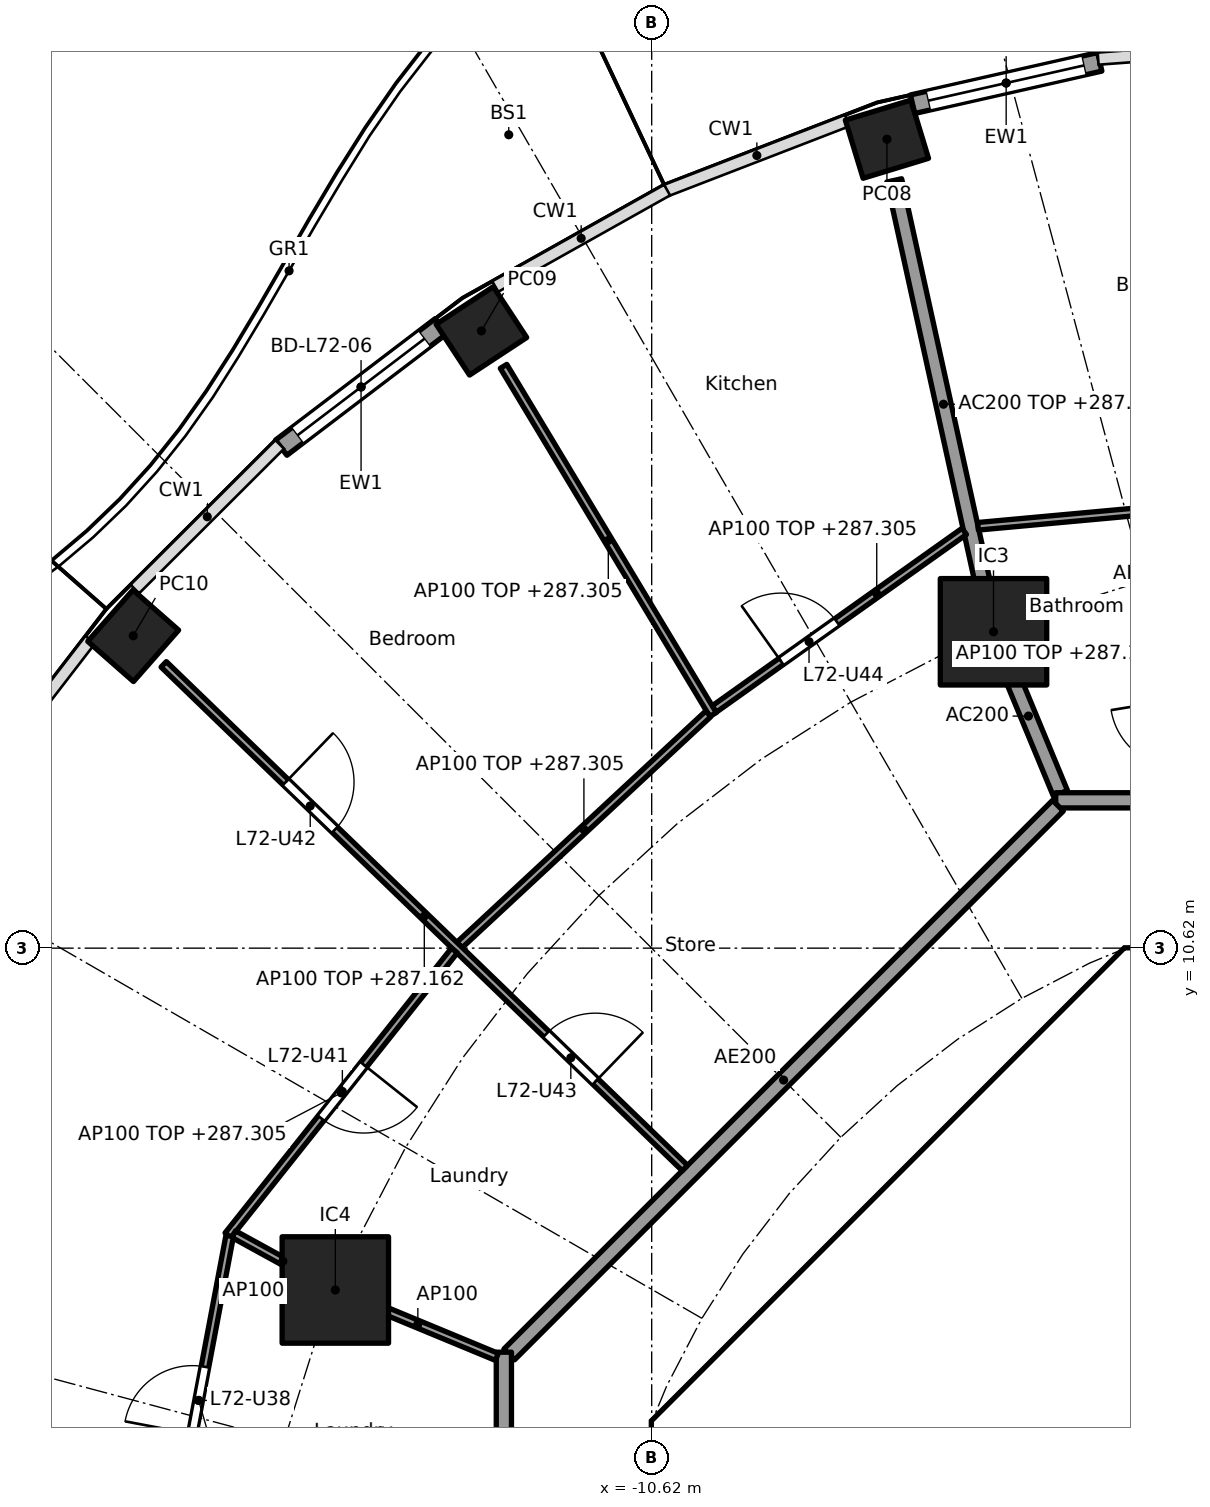
"""IFC4 building model, lengths in metres.
Left out: names, types, materials, properties, quantities, classifications, styles, units other than length and angle.
Written with IfcOpenShell. Run it as: python <this file> out.ifc"""

import sys

from ifc_helpers import new_model, si_unit, direction, frame, frame_2d, origin, origin_2d, place, context, subcontext, project, spatial, polyline, rectangle, hollow_rectangle, outline, extrude, element, fill, save


model = new_model("IFC4")
c1 = context("Model", 3, precision=1e-05, world=origin(), true_north=direction((0.0, 1.0)))
c2 = subcontext(c1, "Body", "Model", "MODEL_VIEW")
j1 = project(units=[si_unit("LENGTHUNIT", "METRE"), si_unit("PLANEANGLEUNIT", "RADIAN")], contexts=[c1])
p1 = place(None, origin())
s1 = spatial("IfcSite", under=j1, at=p1, CompositionType="ELEMENT")
p2 = place(p1, origin())
s2 = spatial("IfcBuilding", under=s1, at=p2, CompositionType="ELEMENT")
p3 = place(p2, frame((0.0, 0.0, 284.4)))
s3 = spatial("IfcBuildingStorey", under=s2, at=p3, CompositionType="ELEMENT", Elevation=284.4)
for number, where, z_axis, x_axis in (
    (1, (-7.525, 21.262, 0.0), (0.0, 0.0, 1.0), (-0.957, -0.292, 0.0)),
    (2, (-12.86, 18.741, 0.0), (0.0, 0.0, 1.0), (-0.836, -0.549, 0.0)),
    (3, (-17.441, 14.73, 0.0), (0.0, 0.0, 1.0), (-0.66, -0.751, 0.0)),
):
    element("IfcColumn", number, at=place(p3, frame(where, z_axis=z_axis, x_axis=x_axis)), inside=s3, PredefinedType="COLUMN", context=c2, shape_type="SweptSolid", body=[
        extrude(hollow_rectangle(XDim=0.9, YDim=0.8, WallThickness=0.028, at=origin_2d()), origin(), (0.0, 0.0, 1.0), 3.7),
    ])
for number, where, z_axis, x_axis in (
    (4, (-6.123, 14.782, 0.0), (0.0, 0.0, 1.0), (1.0, 0.0, 0.0)),
    (5, (-14.782, 6.123, 0.0), (0.0, 0.0, 1.0), (1.0, 0.0, 0.0)),
):
    element("IfcColumn", number, at=place(p3, frame(where, z_axis=z_axis, x_axis=x_axis)), inside=s3, PredefinedType="COLUMN", context=c2, shape_type="SweptSolid", body=[
        extrude(rectangle(XDim=1.4, YDim=1.4, at=origin_2d()), origin(), (0.0, 0.0, 1.0), 3.7),
    ])
p4 = place(p3, frame((-7.188, 21.723, 0.0), z_axis=(0.0, 0.0, 1.0), x_axis=(0.975319584032, 0.220797891756, 0.0)))
e6 = element("IfcWall", 6, at=p4, inside=s3, PredefinedType="SOLIDWALL", context=c2, shape_type="SweptSolid", body=[
    extrude(rectangle(XDim=2.525, YDim=0.25, at=frame_2d((1.263, 0.0))), origin(), (0.0, 0.0, 1.0), 3.44),
])
p5 = place(p4, frame((0.213, 0.0, 0.0)))
e7 = element("IfcOpeningElement", 7, at=p5, cuts=e6, PredefinedType="OPENING", context=c2, shape_type="SweptSolid", body=[
    extrude(rectangle(XDim=2.1, YDim=2.4, at=frame_2d((1.05, 1.2))), frame((0.0, 0.135, 0.0), z_axis=(0.0, -1.0, 0.0), x_axis=(1.0, 0.0, 0.0)), (0.0, 0.0, 1.0), 0.27),
])
p6 = place(p3, frame((-15.495, 17.204, 0.0), z_axis=(0.0, 0.0, 1.0), x_axis=(0.796010739377, 0.605282498339, 0.0)))
e8 = element("IfcWall", 8, at=p6, inside=s3, PredefinedType="SOLIDWALL", context=c2, shape_type="SweptSolid", body=[
    extrude(rectangle(XDim=2.641, YDim=0.25, at=frame_2d((1.32, 0.0))), origin(), (0.0, 0.0, 1.0), 3.44),
])
p7 = place(p6, frame((0.27, 0.0, 0.0)))
e9 = element("IfcOpeningElement", 9, at=p7, cuts=e8, PredefinedType="OPENING", context=c2, shape_type="SweptSolid", body=[
    extrude(rectangle(XDim=2.1, YDim=2.4, at=frame_2d((1.05, 1.2))), frame((0.0, 0.135, 0.0), z_axis=(0.0, -1.0, 0.0), x_axis=(1.0, 0.0, 0.0)), (0.0, 0.0, 1.0), 0.27),
])
p8 = place(p3, frame((-4.613, 9.988, 0.0), z_axis=(0.0, 0.0, 1.0), x_axis=(-0.707106781187, -0.707106781187, 0.0)))
e10 = element("IfcWall", 10, at=p8, inside=s3, PredefinedType="SHEAR", context=c2, shape_type="SweptSolid", body=[
    extrude(rectangle(XDim=7.602, YDim=0.6, at=frame_2d((3.801, 0.0))), origin(), (0.0, 0.0, 1.0), 3.44),
])
p9 = place(p8, frame((0.351, 0.0, 0.0)))
e11 = element("IfcOpeningElement", 11, at=p9, cuts=e10, PredefinedType="OPENING", context=c2, shape_type="SweptSolid", body=[
    extrude(rectangle(XDim=1.1, YDim=2.1, at=frame_2d((0.55, 1.05))), frame((0.0, 0.31, 0.0), z_axis=(0.0, -1.0, 0.0), x_axis=(1.0, 0.0, 0.0)), (0.0, 0.0, 1.0), 0.62),
])
p10 = place(p3, frame((-5.8, 4.3, 0.0), z_axis=(0.0, 0.0, 1.0), x_axis=(0.0, 1.0, 0.0)))
e12 = element("IfcWall", 12, at=p10, inside=s3, PredefinedType="PARTITIONING", context=c2, shape_type="SweptSolid", body=[
    extrude(rectangle(XDim=3.927, YDim=0.15, at=frame_2d((1.963, 0.0))), origin(), (0.0, 0.0, 1.0), 3.44),
])
p11 = place(p10, frame((0.262, 0.0, 0.0)))
e13 = element("IfcOpeningElement", 13, at=p11, cuts=e12, PredefinedType="OPENING", context=c2, shape_type="SweptSolid", body=[
    extrude(rectangle(XDim=0.9, YDim=2.1, at=frame_2d((0.45, 1.05))), frame((0.0, 0.085, 0.0), z_axis=(0.0, -1.0, 0.0), x_axis=(1.0, 0.0, 0.0)), (0.0, 0.0, 1.0), 0.17),
])
p12 = place(p10, frame((2.338, 0.0, 0.0)))
e14 = element("IfcOpeningElement", 14, at=p12, cuts=e12, PredefinedType="OPENING", context=c2, shape_type="SweptSolid", body=[
    extrude(rectangle(XDim=0.9, YDim=2.1, at=frame_2d((0.45, 1.05))), frame((0.0, 0.085, 0.0), z_axis=(0.0, -1.0, 0.0), x_axis=(1.0, 0.0, 0.0)), (0.0, 0.0, 1.0), 0.17),
])
p13 = place(p3, origin())
e15 = element("IfcWall", 15, at=p13, inside=s3, PredefinedType="SHEAR", context=c2, shape_type="SweptSolid", body=[
    extrude(outline(polyline([(-10.2, 4.825), (-9.776, 4.401), (-10.025, 4.152), (-10.025, 3.801), (-10.625, 3.801), (-10.625, 4.401), (-10.2, 4.825)])), origin(), (0.0, 0.0, 1.0), 3.44),
])
p14 = place(p3, origin())
e16 = element("IfcWall", 16, at=p14, inside=s3, PredefinedType="SHEAR", context=c2, shape_type="SweptSolid", body=[
    extrude(outline(polyline([(-4.152, 10.025), (-4.401, 9.776), (-4.825, 10.2), (-4.401, 10.625), (4.401, 10.625), (4.825, 10.2), (4.401, 9.776), (4.152, 10.025), (-4.152, 10.025)])), origin(), (0.0, 0.0, 1.0), 3.44),
])
p15 = place(p3, frame((-8.301, 5.8, 0.0), z_axis=(0.0, 0.0, 1.0), x_axis=(1.0, 0.0, 0.0)))
e17 = element("IfcWall", 17, at=p15, inside=s3, PredefinedType="PARTITIONING", context=c2, shape_type="SweptSolid", body=[
    extrude(rectangle(XDim=2.426, YDim=0.15, at=frame_2d((1.213, 0.0))), origin(), (0.0, 0.0, 1.0), 3.44),
])
p16 = place(p3, frame((-5.243, 12.657, 0.0), z_axis=(0.0, 0.0, 1.0), x_axis=(-0.38273085373, 0.923859888513, 0.0)))
e18 = element("IfcWall", 18, at=p16, inside=s3, PredefinedType="PARTITIONING", context=c2, shape_type="SweptSolid", body=[
    extrude(rectangle(XDim=2.199, YDim=0.2, at=frame_2d((1.1, 0.0))), origin(), (0.0, 0.0, 1.0), 3.44),
])
p17 = place(p3, frame((-6.134, 14.831, 0.0), z_axis=(0.0, 0.0, 1.0), x_axis=(-0.214842475666, 0.976648714047, 0.0)))
e19 = element("IfcWall", 19, at=p17, inside=s3, PredefinedType="PARTITIONING", context=c2, shape_type="SweptSolid", body=[
    extrude(rectangle(XDim=6.031, YDim=0.2, at=frame_2d((3.015, 0.0))), origin(), (0.0, 0.0, 1.0), 2.905),
])
p18 = place(p3, frame((5.104, 12.565, 0.0), z_axis=(0.0, 0.0, 1.0), x_axis=(-1.0, 0.0, 0.0)))
e20 = element("IfcWall", 20, at=p18, inside=s3, PredefinedType="PARTITIONING", context=c2, shape_type="SweptSolid", body=[
    extrude(rectangle(XDim=10.409, YDim=0.2, at=frame_2d((5.205, 0.0))), origin(), (0.0, 0.0, 1.0), 3.44),
])
p19 = place(p18, frame((6.339, 0.0, 0.0)))
e21 = element("IfcOpeningElement", 21, at=p19, cuts=e20, PredefinedType="OPENING", context=c2, shape_type="SweptSolid", body=[
    extrude(rectangle(XDim=1.0, YDim=2.1, at=frame_2d((0.5, 1.05))), frame((0.0, 0.11, 0.0), z_axis=(0.0, -1.0, 0.0), x_axis=(1.0, 0.0, 0.0)), (0.0, 0.0, 1.0), 0.22),
])
p20 = place(p3, frame((-5.275, 12.494, 0.0), z_axis=(0.0, 0.0, 1.0), x_axis=(-0.707106781187, -0.707106781187, 0.0)))
e22 = element("IfcWall", 22, at=p20, inside=s3, PredefinedType="PARTITIONING", context=c2, shape_type="SweptSolid", body=[
    extrude(rectangle(XDim=10.209, YDim=0.2, at=frame_2d((5.104, 0.0))), origin(), (0.0, 0.0, 1.0), 3.44),
])
p21 = place(p3, frame((-12.565, 5.304, 0.0), z_axis=(0.0, 0.0, 1.0), x_axis=(0.0, -1.0, 0.0)))
e23 = element("IfcWall", 23, at=p21, inside=s3, PredefinedType="PARTITIONING", context=c2, shape_type="SweptSolid", body=[
    extrude(rectangle(XDim=10.409, YDim=0.2, at=frame_2d((5.205, 0.0))), origin(), (0.0, 0.0, 1.0), 3.44),
])
p22 = place(p21, frame((4.804, 0.0, 0.0)))
e24 = element("IfcOpeningElement", 24, at=p22, cuts=e23, PredefinedType="OPENING", context=c2, shape_type="SweptSolid", body=[
    extrude(rectangle(XDim=1.0, YDim=2.1, at=frame_2d((0.5, 1.05))), frame((0.0, 0.11, 0.0), z_axis=(0.0, -1.0, 0.0), x_axis=(1.0, 0.0, 0.0)), (0.0, 0.0, 1.0), 0.22),
])
p23 = place(p3, frame((-1.711, 16.592, 0.0), z_axis=(0.0, 0.0, 1.0), x_axis=(-0.995843837247, -0.091077175065, 0.0)))
e25 = element("IfcWall", 25, at=p23, inside=s3, PredefinedType="PARTITIONING", context=c2, shape_type="SweptSolid", body=[
    extrude(rectangle(XDim=4.635, YDim=0.1, at=frame_2d((2.317, 0.0))), origin(), (0.0, 0.0, 1.0), 2.905),
])
p24 = place(p23, frame((0.771, 0.0, 0.0)))
e26 = element("IfcOpeningElement", 26, at=p24, cuts=e25, PredefinedType="OPENING", context=c2, shape_type="SweptSolid", body=[
    extrude(rectangle(XDim=0.9, YDim=2.1, at=frame_2d((0.45, 1.05))), frame((0.0, 0.06, 0.0), z_axis=(0.0, -1.0, 0.0), x_axis=(1.0, 0.0, 0.0)), (0.0, 0.0, 1.0), 0.12),
])
p25 = place(p3, frame((-6.508, 16.103, 0.0), z_axis=(0.0, 0.0, 1.0), x_axis=(-0.815202203556, -0.579176456114, 0.0)))
e27 = element("IfcWall", 27, at=p25, inside=s3, PredefinedType="PARTITIONING", context=c2, shape_type="SweptSolid", body=[
    extrude(rectangle(XDim=4.036, YDim=0.1, at=frame_2d((2.018, 0.0))), origin(), (0.0, 0.0, 1.0), 2.905),
])
p26 = place(p25, frame((2.055, 0.0, 0.0)))
e28 = element("IfcOpeningElement", 28, at=p26, cuts=e27, PredefinedType="OPENING", context=c2, shape_type="SweptSolid", body=[
    extrude(rectangle(XDim=0.9, YDim=2.1, at=frame_2d((0.45, 1.05))), frame((0.0, 0.06, 0.0), z_axis=(0.0, -1.0, 0.0), x_axis=(1.0, 0.0, 0.0)), (0.0, 0.0, 1.0), 0.12),
])
p27 = place(p3, frame((-9.813, 13.693, 0.0), z_axis=(0.0, 0.0, 1.0), x_axis=(-0.515509511815, 0.856883856324, 0.0)))
e29 = element("IfcWall", 29, at=p27, inside=s3, PredefinedType="PARTITIONING", context=c2, shape_type="SweptSolid", body=[
    extrude(rectangle(XDim=5.346, YDim=0.1, at=frame_2d((2.673, 0.0))), origin(), (0.0, 0.0, 1.0), 2.905),
])
p28 = place(p3, frame((-9.875, 13.702, 0.0), z_axis=(0.0, 0.0, 1.0), x_axis=(-0.732618266441, -0.680639754699, 0.0)))
e30 = element("IfcWall", 30, at=p28, inside=s3, PredefinedType="PARTITIONING", context=c2, shape_type="SweptSolid", body=[
    extrude(rectangle(XDim=4.467, YDim=0.1, at=frame_2d((2.233, 0.0))), origin(), (0.0, 0.0, 1.0), 2.905),
])
p29 = place(p3, frame((-10.183, 7.727, 0.0), z_axis=(0.0, 0.0, 1.0), x_axis=(-0.719063433856, 0.694944442449, 0.0)))
e31 = element("IfcWall", 31, at=p29, inside=s3, PredefinedType="PARTITIONING", context=c2, shape_type="SweptSolid", body=[
    extrude(rectangle(XDim=9.535, YDim=0.1, at=frame_2d((4.768, 0.0))), origin(), (0.0, 0.0, 1.0), 2.762),
])
p30 = place(p29, frame((6.405, 0.0, 0.0)))
e32 = element("IfcOpeningElement", 32, at=p30, cuts=e31, PredefinedType="OPENING", context=c2, shape_type="SweptSolid", body=[
    extrude(rectangle(XDim=0.9, YDim=2.1, at=frame_2d((0.45, 1.05))), frame((0.0, 0.06, 0.0), z_axis=(0.0, -1.0, 0.0), x_axis=(1.0, 0.0, 0.0)), (0.0, 0.0, 1.0), 0.12),
])
p31 = place(p29, frame((1.637, 0.0, 0.0)))
e33 = element("IfcOpeningElement", 33, at=p31, cuts=e31, PredefinedType="OPENING", context=c2, shape_type="SweptSolid", body=[
    extrude(rectangle(XDim=0.9, YDim=2.1, at=frame_2d((0.45, 1.05))), frame((0.0, 0.06, 0.0), z_axis=(0.0, -1.0, 0.0), x_axis=(1.0, 0.0, 0.0)), (0.0, 0.0, 1.0), 0.12),
])
p32 = place(p3, frame((-13.216, 10.589, 0.0), z_axis=(0.0, 0.0, 1.0), x_axis=(-0.622272178674, -0.782800955319, 0.0)))
e34 = element("IfcWall", 34, at=p32, inside=s3, PredefinedType="PARTITIONING", context=c2, shape_type="SweptSolid", body=[
    extrude(rectangle(XDim=4.786, YDim=0.1, at=frame_2d((2.393, 0.0))), origin(), (0.0, 0.0, 1.0), 2.905),
])
p33 = place(p32, frame((1.918, 0.0, 0.0)))
e35 = element("IfcOpeningElement", 35, at=p33, cuts=e34, PredefinedType="OPENING", context=c2, shape_type="SweptSolid", body=[
    extrude(rectangle(XDim=0.9, YDim=2.1, at=frame_2d((0.45, 1.05))), frame((0.0, 0.06, 0.0), z_axis=(0.0, -1.0, 0.0), x_axis=(1.0, 0.0, 0.0)), (0.0, 0.0, 1.0), 0.12),
])
p34 = place(p3, frame((-12.657, 5.243, 0.0), z_axis=(0.0, 0.0, 1.0), x_axis=(-0.923864733477, 0.382719158442, 0.0)))
e36 = element("IfcWall", 36, at=p34, inside=s3, PredefinedType="PARTITIONING", context=c2, shape_type="SweptSolid", body=[
    extrude(rectangle(XDim=2.25, YDim=0.1, at=frame_2d((1.125, 0.0))), origin(), (0.0, 0.0, 1.0), 3.44),
])
p35 = place(p3, frame((-14.826, 6.147, 0.0), z_axis=(0.0, 0.0, 1.0), x_axis=(-0.876411496923, 0.481562963755, 0.0)))
e37 = element("IfcWall", 37, at=p35, inside=s3, PredefinedType="PARTITIONING", context=c2, shape_type="SweptSolid", body=[
    extrude(rectangle(XDim=1.475, YDim=0.1, at=frame_2d((0.738, 0.0))), origin(), (0.0, 0.0, 1.0), 3.44),
])
p36 = place(p3, frame((-16.172, 6.832, 0.0), z_axis=(0.0, 0.0, 1.0), x_axis=(-0.185671645069, -0.982611846162, 0.0)))
e38 = element("IfcWall", 38, at=p36, inside=s3, PredefinedType="PARTITIONING", context=c2, shape_type="SweptSolid", body=[
    extrude(rectangle(XDim=4.401, YDim=0.1, at=frame_2d((2.2, 0.0))), origin(), (0.0, 0.0, 1.0), 2.905),
])
p37 = place(p36, frame((1.75, 0.0, 0.0)))
e39 = element("IfcOpeningElement", 39, at=p37, cuts=e38, PredefinedType="OPENING", context=c2, shape_type="SweptSolid", body=[
    extrude(rectangle(XDim=0.9, YDim=2.1, at=frame_2d((0.45, 1.05))), frame((0.0, 0.06, 0.0), z_axis=(0.0, -1.0, 0.0), x_axis=(1.0, 0.0, 0.0)), (0.0, 0.0, 1.0), 0.12),
])
p38 = place(p5, origin())
e40 = element("IfcDoor", 40, at=p38, inside=s3, OperationType="SLIDING_TO_LEFT", PredefinedType="DOOR", context=c2, shape_type="SweptSolid", body=[
    extrude(rectangle(XDim=2.1, YDim=2.4, at=frame_2d((1.05, 1.2))), frame((0.0, 0.025, 0.0), z_axis=(0.0, -1.0, 0.0), x_axis=(1.0, 0.0, 0.0)), (0.0, 0.0, 1.0), 0.05),
])
fill(e7, e40)
p39 = place(p7, origin())
e41 = element("IfcDoor", 41, at=p39, inside=s3, OperationType="SLIDING_TO_LEFT", PredefinedType="DOOR", context=c2, shape_type="SweptSolid", body=[
    extrude(rectangle(XDim=2.1, YDim=2.4, at=frame_2d((1.05, 1.2))), frame((0.0, 0.025, 0.0), z_axis=(0.0, -1.0, 0.0), x_axis=(1.0, 0.0, 0.0)), (0.0, 0.0, 1.0), 0.05),
])
fill(e9, e41)
p40 = place(p11, origin())
e42 = element("IfcDoor", 42, at=p40, inside=s3, OperationType="SINGLE_SWING_LEFT", PredefinedType="DOOR", context=c2, shape_type="SweptSolid", body=[
    extrude(rectangle(XDim=0.9, YDim=2.1, at=frame_2d((0.45, 1.05))), frame((0.0, 0.025, 0.0), z_axis=(0.0, -1.0, 0.0), x_axis=(1.0, 0.0, 0.0)), (0.0, 0.0, 1.0), 0.05),
])
fill(e13, e42)
p41 = place(p12, origin())
e43 = element("IfcDoor", 43, at=p41, inside=s3, OperationType="SINGLE_SWING_LEFT", PredefinedType="DOOR", context=c2, shape_type="SweptSolid", body=[
    extrude(rectangle(XDim=0.9, YDim=2.1, at=frame_2d((0.45, 1.05))), frame((0.0, 0.025, 0.0), z_axis=(0.0, -1.0, 0.0), x_axis=(1.0, 0.0, 0.0)), (0.0, 0.0, 1.0), 0.05),
])
fill(e14, e43)
p42 = place(p9, origin())
e44 = element("IfcDoor", 44, at=p42, inside=s3, OperationType="SINGLE_SWING_LEFT", PredefinedType="DOOR", context=c2, shape_type="SweptSolid", body=[
    extrude(rectangle(XDim=1.1, YDim=2.1, at=frame_2d((0.55, 1.05))), frame((0.0, 0.025, 0.0), z_axis=(0.0, -1.0, 0.0), x_axis=(1.0, 0.0, 0.0)), (0.0, 0.0, 1.0), 0.05),
])
fill(e11, e44)
p43 = place(p37, frame((0.9, 0.0, 0.0), x_axis=(-1.0, 0.0, 0.0)))
e45 = element("IfcDoor", 45, at=p43, inside=s3, OperationType="SINGLE_SWING_LEFT", PredefinedType="DOOR", context=c2, shape_type="SweptSolid", body=[
    extrude(rectangle(XDim=0.9, YDim=2.1, at=frame_2d((0.45, 1.05))), frame((0.0, 0.025, 0.0), z_axis=(0.0, -1.0, 0.0), x_axis=(1.0, 0.0, 0.0)), (0.0, 0.0, 1.0), 0.05),
])
fill(e39, e45)
p44 = place(p33, origin())
e46 = element("IfcDoor", 46, at=p44, inside=s3, OperationType="SINGLE_SWING_LEFT", PredefinedType="DOOR", context=c2, shape_type="SweptSolid", body=[
    extrude(rectangle(XDim=0.9, YDim=2.1, at=frame_2d((0.45, 1.05))), frame((0.0, 0.025, 0.0), z_axis=(0.0, -1.0, 0.0), x_axis=(1.0, 0.0, 0.0)), (0.0, 0.0, 1.0), 0.05),
])
fill(e35, e46)
p45 = place(p30, frame((0.9, 0.0, 0.0), x_axis=(-1.0, 0.0, 0.0)))
e47 = element("IfcDoor", 47, at=p45, inside=s3, OperationType="SINGLE_SWING_LEFT", PredefinedType="DOOR", context=c2, shape_type="SweptSolid", body=[
    extrude(rectangle(XDim=0.9, YDim=2.1, at=frame_2d((0.45, 1.05))), frame((0.0, 0.025, 0.0), z_axis=(0.0, -1.0, 0.0), x_axis=(1.0, 0.0, 0.0)), (0.0, 0.0, 1.0), 0.05),
])
fill(e32, e47)
p46 = place(p31, frame((0.9, 0.0, 0.0), x_axis=(-1.0, 0.0, 0.0)))
e48 = element("IfcDoor", 48, at=p46, inside=s3, OperationType="SINGLE_SWING_RIGHT", PredefinedType="DOOR", context=c2, shape_type="SweptSolid", body=[
    extrude(rectangle(XDim=0.9, YDim=2.1, at=frame_2d((0.45, 1.05))), frame((0.0, 0.025, 0.0), z_axis=(0.0, -1.0, 0.0), x_axis=(1.0, 0.0, 0.0)), (0.0, 0.0, 1.0), 0.05),
])
fill(e33, e48)
p47 = place(p26, frame((0.9, 0.0, 0.0), x_axis=(-1.0, 0.0, 0.0)))
e49 = element("IfcDoor", 49, at=p47, inside=s3, OperationType="SINGLE_SWING_LEFT", PredefinedType="DOOR", context=c2, shape_type="SweptSolid", body=[
    extrude(rectangle(XDim=0.9, YDim=2.1, at=frame_2d((0.45, 1.05))), frame((0.0, 0.025, 0.0), z_axis=(0.0, -1.0, 0.0), x_axis=(1.0, 0.0, 0.0)), (0.0, 0.0, 1.0), 0.05),
])
fill(e28, e49)
save(model, sys.argv[1])
